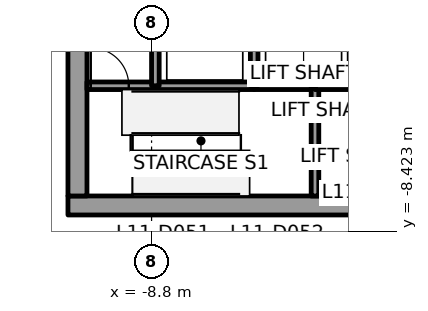
"""IFC4 building model, lengths in metres.
Left out: names, types, materials, properties, quantities, classifications, styles, units other than length and angle.
Written with IfcOpenShell. Run it as: python <this file> out.ifc"""

import sys

from ifc_helpers import new_model, si_unit, direction, frame, frame_2d, origin, place, context, subcontext, project, spatial, rectangle, extrude, element, fill, save


model = new_model("IFC4")
c1 = context("Model", 3, precision=1e-05, world=origin(), true_north=direction((0.0, 1.0)))
c2 = subcontext(c1, "Body", "Model", "MODEL_VIEW")
j1 = project(units=[si_unit("LENGTHUNIT", "METRE"), si_unit("PLANEANGLEUNIT", "RADIAN")], contexts=[c1])
p1 = place(None, origin())
s1 = spatial("IfcSite", under=j1, at=p1, CompositionType="ELEMENT")
p2 = place(p1, origin())
s2 = spatial("IfcBuilding", under=s1, at=p2, CompositionType="ELEMENT")
p3 = place(p2, frame((0.0, 0.0, 62.8)))
s3 = spatial("IfcBuildingStorey", under=s2, at=p3, CompositionType="ELEMENT", Elevation=62.8)
p4 = place(p3, frame((-11.0, -7.75, 0.0), z_axis=(0.0, 0.0, 1.0), x_axis=(1.0, 0.0, 0.0)))
e1 = element("IfcWall", 1, at=p4, inside=s3, PredefinedType="SHEAR", context=c2, shape_type="SweptSolid", body=[
    extrude(rectangle(XDim=22.0, YDim=0.5, at=frame_2d((11.0, 0.0))), origin(), (0.0, 0.0, 1.0), 3.7),
])
p5 = place(p4, frame((10.45, 0.0, 0.0)))
e2 = element("IfcOpeningElement", 2, at=p5, cuts=e1, PredefinedType="OPENING", context=c2, shape_type="SweptSolid", body=[
    extrude(rectangle(XDim=1.1, YDim=2.1, at=frame_2d((0.55, 1.05))), frame((0.0, 0.25, 0.0), z_axis=(0.0, -1.0, 0.0), x_axis=(1.0, 0.0, 0.0)), (0.0, 0.0, 1.0), 0.5),
])
p6 = place(p3, frame((-10.75, -7.5, 0.0), z_axis=(0.0, 0.0, 1.0), x_axis=(0.0, 1.0, 0.0)))
e3 = element("IfcWall", 3, at=p6, inside=s3, PredefinedType="SHEAR", context=c2, shape_type="SweptSolid", body=[
    extrude(rectangle(XDim=15.0, YDim=0.5, at=frame_2d((7.5, 0.0))), origin(), (0.0, 0.0, 1.0), 3.7),
])
p7 = place(p6, frame((6.6, 0.0, 0.0)))
e4 = element("IfcOpeningElement", 4, at=p7, cuts=e3, PredefinedType="OPENING", context=c2, shape_type="SweptSolid", body=[
    extrude(rectangle(XDim=1.8, YDim=2.1, at=frame_2d((0.9, 1.05))), frame((0.0, 0.25, 0.0), z_axis=(0.0, -1.0, 0.0), x_axis=(1.0, 0.0, 0.0)), (0.0, 0.0, 1.0), 0.5),
])
p8 = place(p3, frame((-10.5, -4.6, 0.0), z_axis=(0.0, 0.0, 1.0), x_axis=(1.0, 0.0, 0.0)))
e5 = element("IfcWall", 5, at=p8, inside=s3, PredefinedType="SOLIDWALL", context=c2, shape_type="SweptSolid", body=[
    extrude(rectangle(XDim=1.8, YDim=0.2, at=frame_2d((0.9, 0.0))), origin(), (0.0, 0.0, 1.0), 3.55),
])
p9 = place(p8, frame((0.1, 0.0, 0.0)))
e6 = element("IfcOpeningElement", 6, at=p9, cuts=e5, PredefinedType="OPENING", context=c2, shape_type="SweptSolid", body=[
    extrude(rectangle(XDim=1.0, YDim=2.1, at=frame_2d((0.5, 1.05))), frame((0.0, 0.1, 0.0), z_axis=(0.0, -1.0, 0.0), x_axis=(1.0, 0.0, 0.0)), (0.0, 0.0, 1.0), 0.2),
])
p10 = place(p3, frame((-8.7, -4.6, 0.0), z_axis=(0.0, 0.0, 1.0), x_axis=(1.0, 0.0, 0.0)))
e7 = element("IfcWall", 7, at=p10, inside=s3, PredefinedType="SOLIDWALL", context=c2, shape_type="SweptSolid", body=[
    extrude(rectangle(XDim=2.6, YDim=0.2, at=frame_2d((1.3, 0.0))), origin(), (0.0, 0.0, 1.0), 3.55),
])
p11 = place(p3, frame((-8.7, -4.6, 0.0), z_axis=(0.0, 0.0, 1.0), x_axis=(0.0, 1.0, 0.0)))
e8 = element("IfcWall", 8, at=p11, inside=s3, PredefinedType="SOLIDWALL", context=c2, shape_type="SweptSolid", body=[
    extrude(rectangle(XDim=2.8, YDim=0.2, at=frame_2d((1.4, 0.0))), origin(), (0.0, 0.0, 1.0), 3.55),
])
p12 = place(p3, frame((-6.1, -4.6, 0.0), z_axis=(0.0, 0.0, 1.0), x_axis=(1.0, 0.0, 0.0)))
e9 = element("IfcWall", 9, at=p12, inside=s3, PredefinedType="SOLIDWALL", context=c2, shape_type="SweptSolid", body=[
    extrude(rectangle(XDim=1.6, YDim=0.2, at=frame_2d((0.8, 0.0))), origin(), (0.0, 0.0, 1.0), 3.55),
])
p13 = place(p3, frame((-6.1, -4.6, 0.0), z_axis=(0.0, 0.0, 1.0), x_axis=(0.0, 1.0, 0.0)))
e10 = element("IfcWall", 10, at=p13, inside=s3, PredefinedType="SOLIDWALL", context=c2, shape_type="SweptSolid", body=[
    extrude(rectangle(XDim=2.8, YDim=0.2, at=frame_2d((1.4, 0.0))), origin(), (0.0, 0.0, 1.0), 3.55),
])
p14 = place(p3, frame((-4.5, -4.6, 0.0), z_axis=(0.0, 0.0, 1.0), x_axis=(0.0, -1.0, 0.0)))
e11 = element("IfcWall", 11, at=p14, inside=s3, PredefinedType="SOLIDWALL", context=c2, shape_type="SweptSolid", body=[
    extrude(rectangle(XDim=2.9, YDim=0.2, at=frame_2d((1.45, 0.0))), origin(), (0.0, 0.0, 1.0), 3.55),
])
p15 = place(p3, frame((-4.5, -4.6, 0.0), z_axis=(0.0, 0.0, 1.0), x_axis=(1.0, 0.0, 0.0)))
e12 = element("IfcWall", 12, at=p15, inside=s3, PredefinedType="SOLIDWALL", context=c2, shape_type="SweptSolid", body=[
    extrude(rectangle(XDim=1.0, YDim=0.2, at=frame_2d((0.5, 0.0))), origin(), (0.0, 0.0, 1.0), 3.55),
])
p16 = place(p9, origin())
e13 = element("IfcDoor", 13, at=p16, inside=s3, OperationType="SINGLE_SWING_LEFT", PredefinedType="DOOR", context=c2, shape_type="SweptSolid", body=[
    extrude(rectangle(XDim=1.0, YDim=2.1, at=frame_2d((0.5, 1.05))), frame((0.0, 0.025, 0.0), z_axis=(0.0, -1.0, 0.0), x_axis=(1.0, 0.0, 0.0)), (0.0, 0.0, 1.0), 0.05),
])
fill(e6, e13)
save(model, sys.argv[1])
